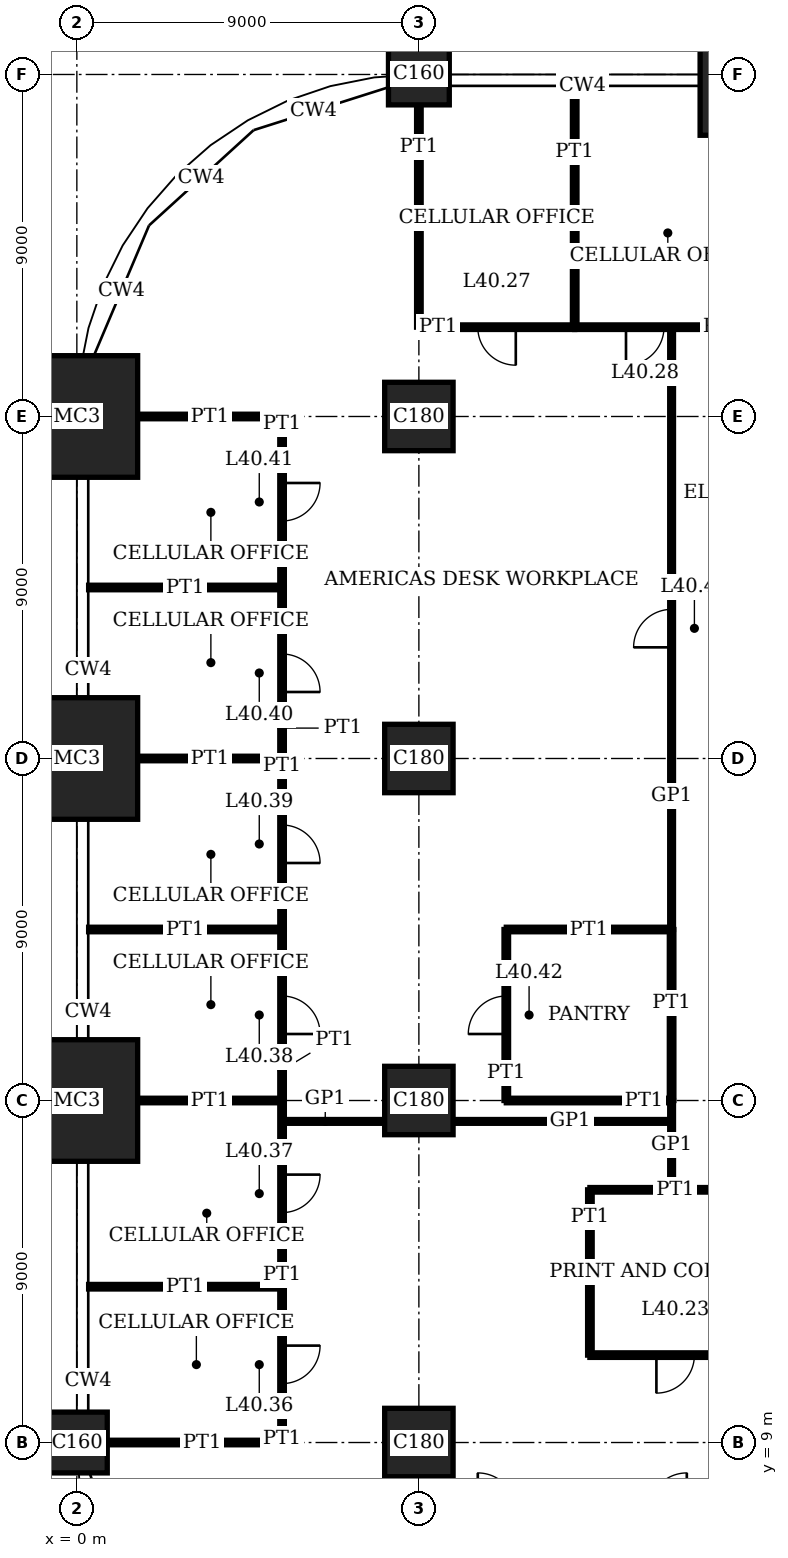
"""IFC4 building model, lengths in metres.
Left out: names, types, materials, properties, quantities, classifications, styles, units other than length and angle.
Written with IfcOpenShell. Run it as: python <this file> out.ifc"""

import sys

from ifc_helpers import new_model, si_unit, direction, frame, frame_2d, origin, origin_2d, place, context, subcontext, project, spatial, rectangle, extrude, element, fill, save


model = new_model("IFC4")
c1 = context("Model", 3, precision=1e-05, world=origin(), true_north=direction((0.0, 1.0)))
c2 = subcontext(c1, "Body", "Model", "MODEL_VIEW")
j1 = project(units=[si_unit("LENGTHUNIT", "METRE"), si_unit("PLANEANGLEUNIT", "RADIAN")], contexts=[c1])
p1 = place(None, origin())
s1 = spatial("IfcSite", under=j1, at=p1, CompositionType="ELEMENT")
p2 = place(p1, origin())
s2 = spatial("IfcBuilding", under=s1, at=p2, CompositionType="ELEMENT")
p3 = place(p2, frame((0.0, 0.0, 166.2)))
s3 = spatial("IfcBuildingStorey", under=s2, at=p3, CompositionType="ELEMENT", Elevation=166.2)
p4 = place(p3, frame((0.0, 9.0, 0.0), z_axis=(0.0, 0.0, 1.0), x_axis=(1.0, 0.0, 0.0)))
e1 = element("IfcColumn", 1, at=p4, inside=s3, PredefinedType="COLUMN", context=c2, shape_type="SweptSolid", body=[
    extrude(rectangle(XDim=1.6, YDim=1.6, at=origin_2d()), origin(), (0.0, 0.0, 1.0), 4.0),
])
for number, where, z_axis, x_axis in (
    (2, (0.0, 18.0, 0.0), (0.0, 0.0, 1.0), (1.0, 0.0, 0.0)),
    (3, (0.0, 27.0, 0.0), (0.0, 0.0, 1.0), (1.0, 0.0, 0.0)),
    (4, (0.0, 36.0, 0.0), (0.0, 0.0, 1.0), (1.0, 0.0, 0.0)),
):
    element("IfcColumn", number, at=place(p3, frame(where, z_axis=z_axis, x_axis=x_axis)), inside=s3, PredefinedType="COLUMN", context=c2, shape_type="SweptSolid", body=[
        extrude(rectangle(XDim=3.2, YDim=3.2, at=origin_2d()), origin(), (0.0, 0.0, 1.0), 4.0),
    ])
for number, where, z_axis, x_axis in (
    (5, (9.0, 9.0, 0.0), (0.0, 0.0, 1.0), (1.0, 0.0, 0.0)),
    (6, (9.0, 18.0, 0.0), (0.0, 0.0, 1.0), (1.0, 0.0, 0.0)),
    (7, (9.0, 27.0, 0.0), (0.0, 0.0, 1.0), (1.0, 0.0, 0.0)),
    (8, (9.0, 36.0, 0.0), (0.0, 0.0, 1.0), (1.0, 0.0, 0.0)),
):
    element("IfcColumn", number, at=place(p3, frame(where, z_axis=z_axis, x_axis=x_axis)), inside=s3, PredefinedType="COLUMN", context=c2, shape_type="SweptSolid", body=[
        extrude(rectangle(XDim=1.8, YDim=1.8, at=origin_2d()), origin(), (0.0, 0.0, 1.0), 4.0),
    ])
p5 = place(p3, frame((9.0, 45.0, 0.0), z_axis=(0.0, 0.0, 1.0), x_axis=(1.0, 0.0, 0.0)))
e9 = element("IfcColumn", 9, at=p5, inside=s3, PredefinedType="COLUMN", context=c2, shape_type="SweptSolid", body=[
    extrude(rectangle(XDim=1.6, YDim=1.6, at=origin_2d()), origin(), (0.0, 0.0, 1.0), 4.0),
])
p6 = place(p3, frame((18.0, 45.0, 0.0), z_axis=(0.0, 0.0, 1.0), x_axis=(1.0, 0.0, 0.0)))
e10 = element("IfcColumn", 10, at=p6, inside=s3, PredefinedType="COLUMN", context=c2, shape_type="SweptSolid", body=[
    extrude(rectangle(XDim=3.2, YDim=3.2, at=origin_2d()), origin(), (0.0, 0.0, 1.0), 4.0),
])
p7 = place(p3, frame((0.8, 9.0, 0.0), z_axis=(0.0, 0.0, 1.0), x_axis=(1.0, 0.0, 0.0)))
e11 = element("IfcWall", 11, at=p7, inside=s3, PredefinedType="PARTITIONING", context=c2, shape_type="SweptSolid", body=[
    extrude(rectangle(XDim=4.6, YDim=0.12, at=frame_2d((2.3, 0.0))), origin(), (0.0, 0.0, 1.0), 3.05),
])
p8 = place(p3, frame((13.5, 11.3, 0.0), z_axis=(0.0, 0.0, 1.0), x_axis=(1.0, 0.0, 0.0)))
e12 = element("IfcWall", 12, at=p8, inside=s3, PredefinedType="PARTITIONING", context=c2, shape_type="SweptSolid", body=[
    extrude(rectangle(XDim=4.5, YDim=0.12, at=frame_2d((2.25, 0.0))), origin(), (0.0, 0.0, 1.0), 3.75),
])
p9 = place(p8, frame((1.75, 0.0, 0.0)))
e13 = element("IfcOpeningElement", 13, at=p9, cuts=e12, PredefinedType="OPENING", context=c2, shape_type="SweptSolid", body=[
    extrude(rectangle(XDim=1.0, YDim=2.4, at=frame_2d((0.5, 1.2))), frame((0.0, 0.07, 0.0), z_axis=(0.0, -1.0, 0.0), x_axis=(1.0, 0.0, 0.0)), (0.0, 0.0, 1.0), 0.14),
])
p10 = place(p3, frame((0.31, 13.1, 0.0), z_axis=(0.0, 0.0, 1.0), x_axis=(1.0, 0.0, 0.0)))
e14 = element("IfcWall", 14, at=p10, inside=s3, PredefinedType="PARTITIONING", context=c2, shape_type="SweptSolid", body=[
    extrude(rectangle(XDim=5.09, YDim=0.12, at=frame_2d((2.545, 0.0))), origin(), (0.0, 0.0, 1.0), 3.75),
])
p11 = place(p3, frame((13.5, 15.65, 0.0), z_axis=(0.0, 0.0, 1.0), x_axis=(1.0, 0.0, 0.0)))
e15 = element("IfcWall", 15, at=p11, inside=s3, PredefinedType="PARTITIONING", context=c2, shape_type="SweptSolid", body=[
    extrude(rectangle(XDim=4.5, YDim=0.12, at=frame_2d((2.25, 0.0))), origin(), (0.0, 0.0, 1.0), 3.75),
])
p12 = place(p3, frame((5.39, 17.45, 0.0), z_axis=(0.0, 0.0, 1.0), x_axis=(1.0, 0.0, 0.0)))
e16 = element("IfcWall", 16, at=p12, inside=s3, PredefinedType="PARTITIONING", context=c2, shape_type="SweptSolid", body=[
    extrude(rectangle(XDim=2.71, YDim=0.1, at=frame_2d((1.355, 0.0))), origin(), (0.0, 0.0, 1.0), 3.05),
])
p13 = place(p3, frame((9.9, 17.45, 0.0), z_axis=(0.0, 0.0, 1.0), x_axis=(1.0, 0.0, 0.0)))
e17 = element("IfcWall", 17, at=p13, inside=s3, PredefinedType="PARTITIONING", context=c2, shape_type="SweptSolid", body=[
    extrude(rectangle(XDim=5.75, YDim=0.1, at=frame_2d((2.875, 0.0))), origin(), (0.0, 0.0, 1.0), 3.05),
])
p14 = place(p3, frame((1.6, 18.0, 0.0), z_axis=(0.0, 0.0, 1.0), x_axis=(1.0, 0.0, 0.0)))
e18 = element("IfcWall", 18, at=p14, inside=s3, PredefinedType="PARTITIONING", context=c2, shape_type="SweptSolid", body=[
    extrude(rectangle(XDim=3.8, YDim=0.12, at=frame_2d((1.9, 0.0))), origin(), (0.0, 0.0, 1.0), 3.05),
])
p15 = place(p3, frame((11.3, 18.0, 0.0), z_axis=(0.0, 0.0, 1.0), x_axis=(1.0, 0.0, 0.0)))
e19 = element("IfcWall", 19, at=p15, inside=s3, PredefinedType="PARTITIONING", context=c2, shape_type="SweptSolid", body=[
    extrude(rectangle(XDim=4.35, YDim=0.12, at=frame_2d((2.175, 0.0))), origin(), (0.0, 0.0, 1.0), 3.05),
])
p16 = place(p3, frame((0.31, 22.5, 0.0), z_axis=(0.0, 0.0, 1.0), x_axis=(1.0, 0.0, 0.0)))
e20 = element("IfcWall", 20, at=p16, inside=s3, PredefinedType="PARTITIONING", context=c2, shape_type="SweptSolid", body=[
    extrude(rectangle(XDim=5.09, YDim=0.12, at=frame_2d((2.545, 0.0))), origin(), (0.0, 0.0, 1.0), 3.1),
])
p17 = place(p3, frame((11.3, 22.5, 0.0), z_axis=(0.0, 0.0, 1.0), x_axis=(1.0, 0.0, 0.0)))
e21 = element("IfcWall", 21, at=p17, inside=s3, PredefinedType="PARTITIONING", context=c2, shape_type="SweptSolid", body=[
    extrude(rectangle(XDim=4.35, YDim=0.12, at=frame_2d((2.175, 0.0))), origin(), (0.0, 0.0, 1.0), 3.1),
])
p18 = place(p3, frame((1.6, 27.0, 0.0), z_axis=(0.0, 0.0, 1.0), x_axis=(1.0, 0.0, 0.0)))
e22 = element("IfcWall", 22, at=p18, inside=s3, PredefinedType="PARTITIONING", context=c2, shape_type="SweptSolid", body=[
    extrude(rectangle(XDim=3.8, YDim=0.12, at=frame_2d((1.9, 0.0))), origin(), (0.0, 0.0, 1.0), 3.05),
])
p19 = place(p3, frame((0.31, 31.5, 0.0), z_axis=(0.0, 0.0, 1.0), x_axis=(1.0, 0.0, 0.0)))
e23 = element("IfcWall", 23, at=p19, inside=s3, PredefinedType="PARTITIONING", context=c2, shape_type="SweptSolid", body=[
    extrude(rectangle(XDim=5.09, YDim=0.12, at=frame_2d((2.545, 0.0))), origin(), (0.0, 0.0, 1.0), 3.1),
])
p20 = place(p3, frame((1.6, 36.0, 0.0), z_axis=(0.0, 0.0, 1.0), x_axis=(1.0, 0.0, 0.0)))
e24 = element("IfcWall", 24, at=p20, inside=s3, PredefinedType="PARTITIONING", context=c2, shape_type="SweptSolid", body=[
    extrude(rectangle(XDim=3.8, YDim=0.12, at=frame_2d((1.9, 0.0))), origin(), (0.0, 0.0, 1.0), 3.05),
])
p21 = place(p3, frame((9.0, 38.35, 0.0), z_axis=(0.0, 0.0, 1.0), x_axis=(1.0, 0.0, 0.0)))
e25 = element("IfcWall", 25, at=p21, inside=s3, PredefinedType="PARTITIONING", context=c2, shape_type="SweptSolid", body=[
    extrude(rectangle(XDim=4.1, YDim=0.12, at=frame_2d((2.05, 0.0))), origin(), (0.0, 0.0, 1.0), 3.75),
])
p22 = place(p21, frame((1.55, 0.0, 0.0)))
e26 = element("IfcOpeningElement", 26, at=p22, cuts=e25, PredefinedType="OPENING", context=c2, shape_type="SweptSolid", body=[
    extrude(rectangle(XDim=1.0, YDim=2.4, at=frame_2d((0.5, 1.2))), frame((0.0, 0.07, 0.0), z_axis=(0.0, -1.0, 0.0), x_axis=(1.0, 0.0, 0.0)), (0.0, 0.0, 1.0), 0.14),
])
p23 = place(p3, frame((13.1, 38.35, 0.0), z_axis=(0.0, 0.0, 1.0), x_axis=(1.0, 0.0, 0.0)))
e27 = element("IfcWall", 27, at=p23, inside=s3, PredefinedType="PARTITIONING", context=c2, shape_type="SweptSolid", body=[
    extrude(rectangle(XDim=4.9, YDim=0.12, at=frame_2d((2.45, 0.0))), origin(), (0.0, 0.0, 1.0), 3.75),
])
p24 = place(p23, frame((1.35, 0.0, 0.0)))
e28 = element("IfcOpeningElement", 28, at=p24, cuts=e27, PredefinedType="OPENING", context=c2, shape_type="SweptSolid", body=[
    extrude(rectangle(XDim=1.0, YDim=2.4, at=frame_2d((0.5, 1.2))), frame((0.0, 0.07, 0.0), z_axis=(0.0, -1.0, 0.0), x_axis=(1.0, 0.0, 0.0)), (0.0, 0.0, 1.0), 0.14),
])
p25 = place(p3, frame((5.4, 9.0, 0.0), z_axis=(0.0, 0.0, 1.0), x_axis=(0.0, 1.0, 0.0)))
e29 = element("IfcWall", 29, at=p25, inside=s3, PredefinedType="PARTITIONING", context=c2, shape_type="SweptSolid", body=[
    extrude(rectangle(XDim=4.1, YDim=0.12, at=frame_2d((2.05, 0.0))), origin(), (0.0, 0.0, 1.0), 3.75),
])
p26 = place(p25, frame((1.55, 0.0, 0.0)))
e30 = element("IfcOpeningElement", 30, at=p26, cuts=e29, PredefinedType="OPENING", context=c2, shape_type="SweptSolid", body=[
    extrude(rectangle(XDim=1.0, YDim=2.4, at=frame_2d((0.5, 1.2))), frame((0.0, 0.07, 0.0), z_axis=(0.0, -1.0, 0.0), x_axis=(1.0, 0.0, 0.0)), (0.0, 0.0, 1.0), 0.14),
])
p27 = place(p3, frame((5.4, 13.1, 0.0), z_axis=(0.0, 0.0, 1.0), x_axis=(0.0, 1.0, 0.0)))
e31 = element("IfcWall", 31, at=p27, inside=s3, PredefinedType="PARTITIONING", context=c2, shape_type="SweptSolid", body=[
    extrude(rectangle(XDim=4.9, YDim=0.12, at=frame_2d((2.45, 0.0))), origin(), (0.0, 0.0, 1.0), 3.75),
])
p28 = place(p27, frame((1.95, 0.0, 0.0)))
e32 = element("IfcOpeningElement", 32, at=p28, cuts=e31, PredefinedType="OPENING", context=c2, shape_type="SweptSolid", body=[
    extrude(rectangle(XDim=1.0, YDim=2.4, at=frame_2d((0.5, 1.2))), frame((0.0, 0.07, 0.0), z_axis=(0.0, -1.0, 0.0), x_axis=(1.0, 0.0, 0.0)), (0.0, 0.0, 1.0), 0.14),
])
p29 = place(p3, frame((5.4, 18.0, 0.0), z_axis=(0.0, 0.0, 1.0), x_axis=(0.0, 1.0, 0.0)))
e33 = element("IfcWall", 33, at=p29, inside=s3, PredefinedType="PARTITIONING", context=c2, shape_type="SweptSolid", body=[
    extrude(rectangle(XDim=4.5, YDim=0.12, at=frame_2d((2.25, 0.0))), origin(), (0.0, 0.0, 1.0), 3.75),
])
p30 = place(p29, frame((1.75, 0.0, 0.0)))
e34 = element("IfcOpeningElement", 34, at=p30, cuts=e33, PredefinedType="OPENING", context=c2, shape_type="SweptSolid", body=[
    extrude(rectangle(XDim=1.0, YDim=2.4, at=frame_2d((0.5, 1.2))), frame((0.0, 0.07, 0.0), z_axis=(0.0, -1.0, 0.0), x_axis=(1.0, 0.0, 0.0)), (0.0, 0.0, 1.0), 0.14),
])
p31 = place(p3, frame((5.4, 22.5, 0.0), z_axis=(0.0, 0.0, 1.0), x_axis=(0.0, 1.0, 0.0)))
e35 = element("IfcWall", 35, at=p31, inside=s3, PredefinedType="PARTITIONING", context=c2, shape_type="SweptSolid", body=[
    extrude(rectangle(XDim=4.5, YDim=0.12, at=frame_2d((2.25, 0.0))), origin(), (0.0, 0.0, 1.0), 3.75),
])
p32 = place(p31, frame((1.75, 0.0, 0.0)))
e36 = element("IfcOpeningElement", 36, at=p32, cuts=e35, PredefinedType="OPENING", context=c2, shape_type="SweptSolid", body=[
    extrude(rectangle(XDim=1.0, YDim=2.4, at=frame_2d((0.5, 1.2))), frame((0.0, 0.07, 0.0), z_axis=(0.0, -1.0, 0.0), x_axis=(1.0, 0.0, 0.0)), (0.0, 0.0, 1.0), 0.14),
])
p33 = place(p3, frame((5.4, 27.0, 0.0), z_axis=(0.0, 0.0, 1.0), x_axis=(0.0, 1.0, 0.0)))
e37 = element("IfcWall", 37, at=p33, inside=s3, PredefinedType="PARTITIONING", context=c2, shape_type="SweptSolid", body=[
    extrude(rectangle(XDim=4.5, YDim=0.12, at=frame_2d((2.25, 0.0))), origin(), (0.0, 0.0, 1.0), 3.75),
])
p34 = place(p33, frame((1.75, 0.0, 0.0)))
e38 = element("IfcOpeningElement", 38, at=p34, cuts=e37, PredefinedType="OPENING", context=c2, shape_type="SweptSolid", body=[
    extrude(rectangle(XDim=1.0, YDim=2.4, at=frame_2d((0.5, 1.2))), frame((0.0, 0.07, 0.0), z_axis=(0.0, -1.0, 0.0), x_axis=(1.0, 0.0, 0.0)), (0.0, 0.0, 1.0), 0.14),
])
p35 = place(p3, frame((5.4, 31.5, 0.0), z_axis=(0.0, 0.0, 1.0), x_axis=(0.0, 1.0, 0.0)))
e39 = element("IfcWall", 39, at=p35, inside=s3, PredefinedType="PARTITIONING", context=c2, shape_type="SweptSolid", body=[
    extrude(rectangle(XDim=4.5, YDim=0.12, at=frame_2d((2.25, 0.0))), origin(), (0.0, 0.0, 1.0), 3.75),
])
p36 = place(p35, frame((1.75, 0.0, 0.0)))
e40 = element("IfcOpeningElement", 40, at=p36, cuts=e39, PredefinedType="OPENING", context=c2, shape_type="SweptSolid", body=[
    extrude(rectangle(XDim=1.0, YDim=2.4, at=frame_2d((0.5, 1.2))), frame((0.0, 0.07, 0.0), z_axis=(0.0, -1.0, 0.0), x_axis=(1.0, 0.0, 0.0)), (0.0, 0.0, 1.0), 0.14),
])
p37 = place(p3, frame((9.0, 38.35, 0.0), z_axis=(0.0, 0.0, 1.0), x_axis=(0.0, 1.0, 0.0)))
e41 = element("IfcWall", 41, at=p37, inside=s3, PredefinedType="PARTITIONING", context=c2, shape_type="SweptSolid", body=[
    extrude(rectangle(XDim=5.85, YDim=0.12, at=frame_2d((2.925, 0.0))), origin(), (0.0, 0.0, 1.0), 3.05),
])
p38 = place(p3, frame((11.3, 18.0, 0.0), z_axis=(0.0, 0.0, 1.0), x_axis=(0.0, 1.0, 0.0)))
e42 = element("IfcWall", 42, at=p38, inside=s3, PredefinedType="PARTITIONING", context=c2, shape_type="SweptSolid", body=[
    extrude(rectangle(XDim=4.5, YDim=0.12, at=frame_2d((2.25, 0.0))), origin(), (0.0, 0.0, 1.0), 3.75),
])
p39 = place(p38, frame((1.75, 0.0, 0.0)))
e43 = element("IfcOpeningElement", 43, at=p39, cuts=e42, PredefinedType="OPENING", context=c2, shape_type="SweptSolid", body=[
    extrude(rectangle(XDim=1.0, YDim=2.4, at=frame_2d((0.5, 1.2))), frame((0.0, 0.07, 0.0), z_axis=(0.0, -1.0, 0.0), x_axis=(1.0, 0.0, 0.0)), (0.0, 0.0, 1.0), 0.14),
])
p40 = place(p3, frame((13.1, 38.35, 0.0), z_axis=(0.0, 0.0, 1.0), x_axis=(0.0, 1.0, 0.0)))
e44 = element("IfcWall", 44, at=p40, inside=s3, PredefinedType="PARTITIONING", context=c2, shape_type="SweptSolid", body=[
    extrude(rectangle(XDim=6.34, YDim=0.12, at=frame_2d((3.17, 0.0))), origin(), (0.0, 0.0, 1.0), 3.75),
])
p41 = place(p3, frame((13.5, 11.3, 0.0), z_axis=(0.0, 0.0, 1.0), x_axis=(0.0, 1.0, 0.0)))
e45 = element("IfcWall", 45, at=p41, inside=s3, PredefinedType="PARTITIONING", context=c2, shape_type="SweptSolid", body=[
    extrude(rectangle(XDim=4.35, YDim=0.12, at=frame_2d((2.175, 0.0))), origin(), (0.0, 0.0, 1.0), 3.75),
])
p42 = place(p3, frame((15.65, 18.0, 0.0), z_axis=(0.0, 0.0, 1.0), x_axis=(0.0, 1.0, 0.0)))
e46 = element("IfcWall", 46, at=p42, inside=s3, PredefinedType="PARTITIONING", context=c2, shape_type="SweptSolid", body=[
    extrude(rectangle(XDim=4.5, YDim=0.12, at=frame_2d((2.25, 0.0))), origin(), (0.0, 0.0, 1.0), 3.75),
])
p43 = place(p3, frame((15.65, 15.65, 0.0), z_axis=(0.0, 0.0, 1.0), x_axis=(0.0, 1.0, 0.0)))
e47 = element("IfcWall", 47, at=p43, inside=s3, PredefinedType="PARTITIONING", context=c2, shape_type="SweptSolid", body=[
    extrude(rectangle(XDim=2.35, YDim=0.1, at=frame_2d((1.175, 0.0))), origin(), (0.0, 0.0, 1.0), 3.75),
])
p44 = place(p3, frame((15.65, 22.5, 0.0), z_axis=(0.0, 0.0, 1.0), x_axis=(0.0, 1.0, 0.0)))
e48 = element("IfcWall", 48, at=p44, inside=s3, PredefinedType="PARTITIONING", context=c2, shape_type="SweptSolid", body=[
    extrude(rectangle(XDim=15.85, YDim=0.1, at=frame_2d((7.925, 0.0))), origin(), (0.0, 0.0, 1.0), 3.75),
])
p45 = place(p44, frame((7.425, 0.0, 0.0)))
e49 = element("IfcOpeningElement", 49, at=p45, cuts=e48, PredefinedType="OPENING", context=c2, shape_type="SweptSolid", body=[
    extrude(rectangle(XDim=1.0, YDim=2.4, at=frame_2d((0.5, 1.2))), frame((0.0, 0.06, 0.0), z_axis=(0.0, -1.0, 0.0), x_axis=(1.0, 0.0, 0.0)), (0.0, 0.0, 1.0), 0.12),
])
p46 = place(p9, origin())
e50 = element("IfcDoor", 50, at=p46, inside=s3, OperationType="SINGLE_SWING_LEFT", PredefinedType="DOOR", context=c2, shape_type="SweptSolid", body=[
    extrude(rectangle(XDim=1.0, YDim=2.4, at=frame_2d((0.5, 1.2))), frame((0.0, 0.025, 0.0), z_axis=(0.0, -1.0, 0.0), x_axis=(1.0, 0.0, 0.0)), (0.0, 0.0, 1.0), 0.05),
])
fill(e13, e50)
p47 = place(p22, origin())
e51 = element("IfcDoor", 51, at=p47, inside=s3, OperationType="SINGLE_SWING_RIGHT", PredefinedType="DOOR", context=c2, shape_type="SweptSolid", body=[
    extrude(rectangle(XDim=1.0, YDim=2.4, at=frame_2d((0.5, 1.2))), frame((0.0, 0.025, 0.0), z_axis=(0.0, -1.0, 0.0), x_axis=(1.0, 0.0, 0.0)), (0.0, 0.0, 1.0), 0.05),
])
fill(e26, e51)
p48 = place(p24, origin())
e52 = element("IfcDoor", 52, at=p48, inside=s3, OperationType="SINGLE_SWING_LEFT", PredefinedType="DOOR", context=c2, shape_type="SweptSolid", body=[
    extrude(rectangle(XDim=1.0, YDim=2.4, at=frame_2d((0.5, 1.2))), frame((0.0, 0.025, 0.0), z_axis=(0.0, -1.0, 0.0), x_axis=(1.0, 0.0, 0.0)), (0.0, 0.0, 1.0), 0.05),
])
fill(e28, e52)
p49 = place(p26, origin())
e53 = element("IfcDoor", 53, at=p49, inside=s3, OperationType="SINGLE_SWING_RIGHT", PredefinedType="DOOR", context=c2, shape_type="SweptSolid", body=[
    extrude(rectangle(XDim=1.0, YDim=2.4, at=frame_2d((0.5, 1.2))), frame((0.0, 0.025, 0.0), z_axis=(0.0, -1.0, 0.0), x_axis=(1.0, 0.0, 0.0)), (0.0, 0.0, 1.0), 0.05),
])
fill(e30, e53)
p50 = place(p28, origin())
e54 = element("IfcDoor", 54, at=p50, inside=s3, OperationType="SINGLE_SWING_RIGHT", PredefinedType="DOOR", context=c2, shape_type="SweptSolid", body=[
    extrude(rectangle(XDim=1.0, YDim=2.4, at=frame_2d((0.5, 1.2))), frame((0.0, 0.025, 0.0), z_axis=(0.0, -1.0, 0.0), x_axis=(1.0, 0.0, 0.0)), (0.0, 0.0, 1.0), 0.05),
])
fill(e32, e54)
p51 = place(p30, origin())
e55 = element("IfcDoor", 55, at=p51, inside=s3, OperationType="SINGLE_SWING_LEFT", PredefinedType="DOOR", context=c2, shape_type="SweptSolid", body=[
    extrude(rectangle(XDim=1.0, YDim=2.4, at=frame_2d((0.5, 1.2))), frame((0.0, 0.025, 0.0), z_axis=(0.0, -1.0, 0.0), x_axis=(1.0, 0.0, 0.0)), (0.0, 0.0, 1.0), 0.05),
])
fill(e34, e55)
p52 = place(p32, origin())
e56 = element("IfcDoor", 56, at=p52, inside=s3, OperationType="SINGLE_SWING_LEFT", PredefinedType="DOOR", context=c2, shape_type="SweptSolid", body=[
    extrude(rectangle(XDim=1.0, YDim=2.4, at=frame_2d((0.5, 1.2))), frame((0.0, 0.025, 0.0), z_axis=(0.0, -1.0, 0.0), x_axis=(1.0, 0.0, 0.0)), (0.0, 0.0, 1.0), 0.05),
])
fill(e36, e56)
p53 = place(p34, origin())
e57 = element("IfcDoor", 57, at=p53, inside=s3, OperationType="SINGLE_SWING_LEFT", PredefinedType="DOOR", context=c2, shape_type="SweptSolid", body=[
    extrude(rectangle(XDim=1.0, YDim=2.4, at=frame_2d((0.5, 1.2))), frame((0.0, 0.025, 0.0), z_axis=(0.0, -1.0, 0.0), x_axis=(1.0, 0.0, 0.0)), (0.0, 0.0, 1.0), 0.05),
])
fill(e38, e57)
p54 = place(p36, origin())
e58 = element("IfcDoor", 58, at=p54, inside=s3, OperationType="SINGLE_SWING_RIGHT", PredefinedType="DOOR", context=c2, shape_type="SweptSolid", body=[
    extrude(rectangle(XDim=1.0, YDim=2.4, at=frame_2d((0.5, 1.2))), frame((0.0, 0.025, 0.0), z_axis=(0.0, -1.0, 0.0), x_axis=(1.0, 0.0, 0.0)), (0.0, 0.0, 1.0), 0.05),
])
fill(e40, e58)
p55 = place(p39, origin())
e59 = element("IfcDoor", 59, at=p55, inside=s3, OperationType="SINGLE_SWING_RIGHT", PredefinedType="DOOR", context=c2, shape_type="SweptSolid", body=[
    extrude(rectangle(XDim=1.0, YDim=2.4, at=frame_2d((0.5, 1.2))), frame((0.0, 0.025, 0.0), z_axis=(0.0, -1.0, 0.0), x_axis=(1.0, 0.0, 0.0)), (0.0, 0.0, 1.0), 0.05),
])
fill(e43, e59)
p56 = place(p45, origin())
e60 = element("IfcDoor", 60, at=p56, inside=s3, OperationType="SINGLE_SWING_RIGHT", PredefinedType="DOOR", context=c2, shape_type="SweptSolid", body=[
    extrude(rectangle(XDim=1.0, YDim=2.4, at=frame_2d((0.5, 1.2))), frame((0.0, 0.02, 0.0), z_axis=(0.0, -1.0, 0.0), x_axis=(1.0, 0.0, 0.0)), (0.0, 0.0, 1.0), 0.04),
])
fill(e49, e60)
save(model, sys.argv[1])
